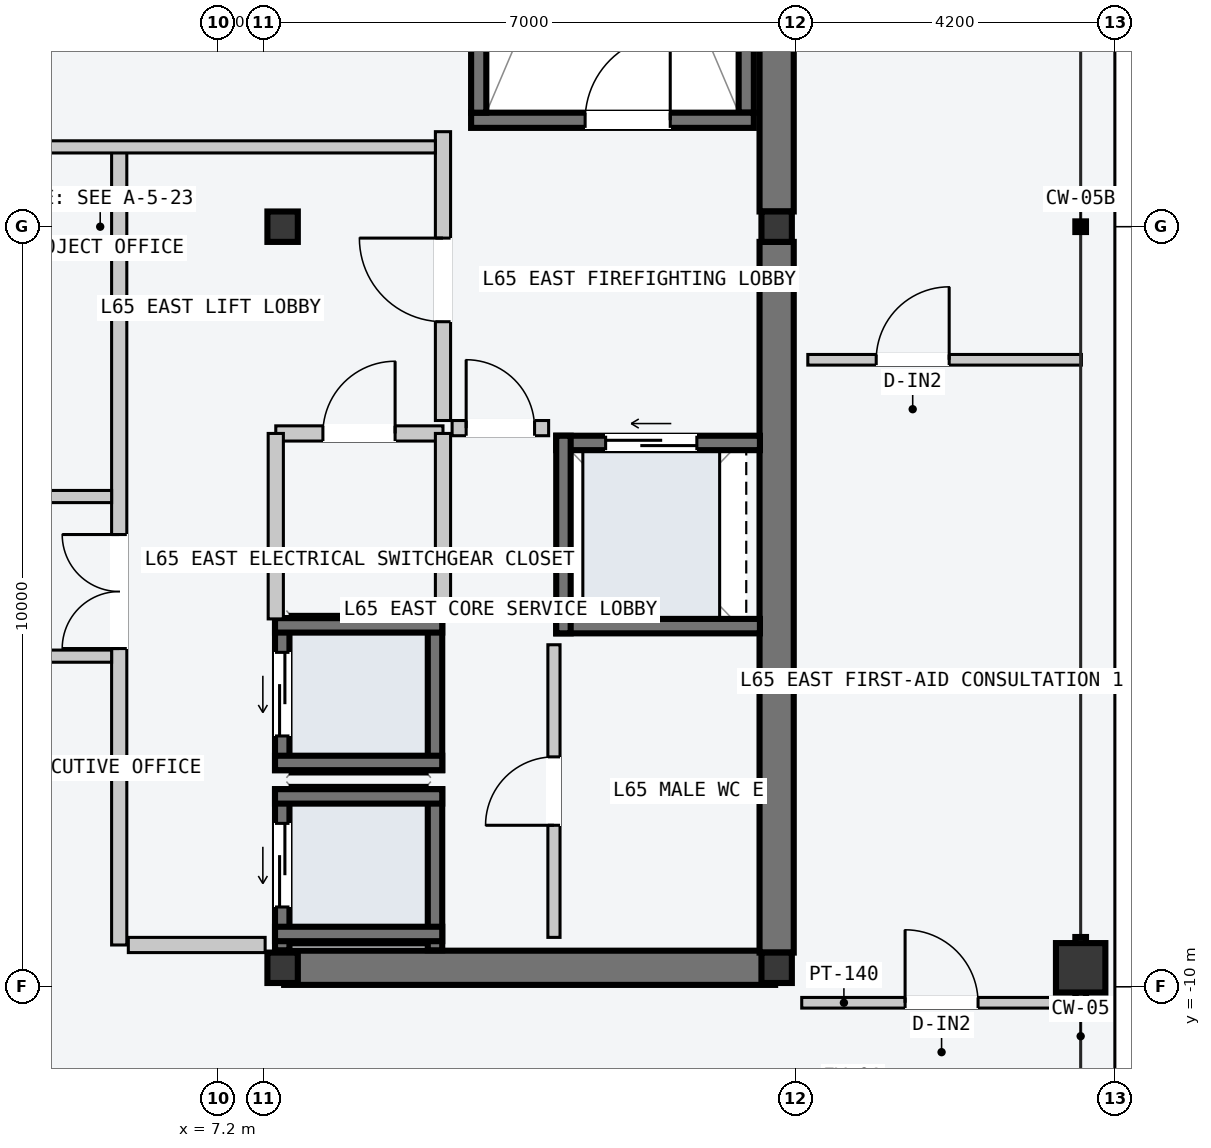
"""IFC4 building model, lengths in metres.
Left out: names, types, materials, properties, quantities, classifications, styles, units other than length and angle.
Written with IfcOpenShell. Run it as: python <this file> out.ifc"""

import sys

from ifc_helpers import new_model, si_unit, direction, frame, frame_2d, origin, origin_2d, place, context, subcontext, project, spatial, rectangle, hollow_rectangle, i_section, extrude, element, fill, save


model = new_model("IFC4")
c1 = context("Model", 3, precision=1e-05, world=origin(), true_north=direction((0.0, 1.0)))
c2 = subcontext(c1, "Body", "Model", "MODEL_VIEW")
j1 = project(units=[si_unit("LENGTHUNIT", "METRE"), si_unit("PLANEANGLEUNIT", "RADIAN")], contexts=[c1])
p1 = place(None, origin())
s1 = spatial("IfcSite", under=j1, at=p1, CompositionType="ELEMENT")
p2 = place(p1, origin())
s2 = spatial("IfcBuilding", under=s1, at=p2, CompositionType="ELEMENT")
p3 = place(p2, frame((0.0, 0.0, 247.2)))
s3 = spatial("IfcBuildingStorey", under=s2, at=p3, CompositionType="ELEMENT", Elevation=247.2)
p4 = place(p3, frame((8.07, -9.75, -0.2), z_axis=(0.0, 0.0, 1.0), x_axis=(1.0, 0.0, 0.0)))
e1 = element("IfcWall", 1, at=p4, inside=s3, PredefinedType="SHEAR", context=c2, shape_type="SweptSolid", body=[
    extrude(rectangle(XDim=6.46, YDim=0.45, at=frame_2d((3.23, 0.0))), origin(), (0.0, 0.0, 1.0), 3.6),
])
for number, where, z_axis, x_axis in (
    (2, (14.55, -9.55, -0.2), (0.0, 0.0, 1.0), (0.0, 1.0, 0.0)),
    (3, (14.55, 0.2, -0.2), (0.0, 0.0, 1.0), (0.0, 1.0, 0.0)),
):
    element("IfcWall", number, at=place(p3, frame(where, z_axis=z_axis, x_axis=x_axis)), inside=s3, PredefinedType="SHEAR", context=c2, shape_type="SweptSolid", body=[
        extrude(rectangle(XDim=9.35, YDim=0.45, at=frame_2d((4.675, 0.0))), origin(), (0.0, 0.0, 1.0), 3.6),
    ])
p5 = place(p3, frame((14.15, 1.5, -0.2), z_axis=(0.0, 0.0, 1.0), x_axis=(0.0, 1.0, 0.0)))
e4 = element("IfcWall", 4, at=p5, inside=s3, PredefinedType="SOLIDWALL", context=c2, shape_type="SweptSolid", body=[
    extrude(rectangle(XDim=7.8, YDim=0.2, at=frame_2d((3.9, 0.0))), origin(), (0.0, 0.0, 1.0), 3.6),
])
p6 = place(p3, frame((10.53, 1.4, -0.2), z_axis=(0.0, 0.0, 1.0), x_axis=(1.0, 0.0, 0.0)))
e5 = element("IfcWall", 5, at=p6, inside=s3, PredefinedType="SOLIDWALL", context=c2, shape_type="SweptSolid", body=[
    extrude(rectangle(XDim=3.72, YDim=0.2, at=frame_2d((1.86, 0.0))), origin(), (0.0, 0.0, 1.0), 3.6),
])
p7 = place(p6, frame((1.5, 0.0, 0.2)))
e6 = element("IfcOpeningElement", 6, at=p7, cuts=e5, PredefinedType="OPENING", context=c2, shape_type="SweptSolid", body=[
    extrude(rectangle(XDim=1.12, YDim=2.18, at=frame_2d((0.56, 1.09))), frame((0.0, 0.11, 0.0), z_axis=(0.0, -1.0, 0.0), x_axis=(1.0, 0.0, 0.0)), (0.0, 0.0, 1.0), 0.22),
])
p8 = place(p3, frame((10.63, 1.5, -0.2), z_axis=(0.0, 0.0, 1.0), x_axis=(0.0, 1.0, 0.0)))
e7 = element("IfcWall", 7, at=p8, inside=s3, PredefinedType="SOLIDWALL", context=c2, shape_type="SweptSolid", body=[
    extrude(rectangle(XDim=7.8, YDim=0.2, at=frame_2d((3.9, 0.0))), origin(), (0.0, 0.0, 1.0), 3.6),
])
for number, where, z_axis, x_axis in (
    (8, (8.05, -9.75, 0.0), (0.0, 0.0, 1.0), (1.0, 0.0, 0.0)),
    (9, (8.05, 0.0, 0.0), (0.0, 0.0, 1.0), (1.0, 0.0, 0.0)),
    (10, (14.55, -9.75, 0.0), (0.0, 0.0, 1.0), (1.0, 0.0, 0.0)),
    (11, (14.55, 0.0, 0.0), (0.0, 0.0, 1.0), (1.0, 0.0, 0.0)),
):
    element("IfcColumn", number, at=place(p3, frame(where, z_axis=z_axis, x_axis=x_axis)), inside=s3, PredefinedType="COLUMN", context=c2, shape_type="SweptSolid", body=[
        extrude(i_section(OverallWidth=0.4, OverallDepth=0.4, WebThickness=0.013, FlangeThickness=0.021, at=origin_2d()), origin(), (0.0, 0.0, 1.0), 3.6),
    ])
p9 = place(p3, frame((18.55, -9.75, 0.0), z_axis=(0.0, 0.0, 1.0), x_axis=(0.0, 1.0, 0.0)))
e12 = element("IfcColumn", 12, at=p9, inside=s3, PredefinedType="COLUMN", context=c2, shape_type="SweptSolid", body=[
    extrude(hollow_rectangle(XDim=0.65, YDim=0.65, WallThickness=0.028, at=origin_2d()), origin(), (0.0, 0.0, 1.0), 3.6),
])
p10 = place(p3, frame((8.045, -9.52, -0.2), z_axis=(0.0, 0.0, 1.0), x_axis=(0.0, 1.0, 0.0)))
e13 = element("IfcWall", 13, at=p10, inside=s3, PredefinedType="SOLIDWALL", context=c2, shape_type="SweptSolid", body=[
    extrude(rectangle(XDim=2.12, YDim=0.19, at=frame_2d((1.06, 0.0))), origin(), (0.0, 0.0, 1.0), 3.6),
])
p11 = place(p10, frame((0.57, 0.0, 0.2)))
e14 = element("IfcOpeningElement", 14, at=p11, cuts=e13, PredefinedType="OPENING", context=c2, shape_type="SweptSolid", body=[
    extrude(rectangle(XDim=1.1, YDim=2.2, at=frame_2d((0.55, 1.1))), frame((0.0, 0.105, 0.0), z_axis=(0.0, -1.0, 0.0), x_axis=(1.0, 0.0, 0.0)), (0.0, 0.0, 1.0), 0.21),
])
p12 = place(p3, frame((10.055, -9.52, -0.2), z_axis=(0.0, 0.0, 1.0), x_axis=(0.0, 1.0, 0.0)))
e15 = element("IfcWall", 15, at=p12, inside=s3, PredefinedType="SOLIDWALL", context=c2, shape_type="SweptSolid", body=[
    extrude(rectangle(XDim=2.12, YDim=0.19, at=frame_2d((1.06, 0.0))), origin(), (0.0, 0.0, 1.0), 3.6),
])
for number, where, z_axis, x_axis in (
    (16, (7.95, -7.495, -0.2), (0.0, 0.0, 1.0), (1.0, 0.0, 0.0)),
    (17, (7.95, -9.305, -0.2), (0.0, 0.0, 1.0), (1.0, 0.0, 0.0)),
):
    element("IfcWall", number, at=place(p3, frame(where, z_axis=z_axis, x_axis=x_axis)), inside=s3, PredefinedType="SOLIDWALL", context=c2, shape_type="SweptSolid", body=[
        extrude(rectangle(XDim=2.2, YDim=0.19, at=frame_2d((1.1, 0.0))), origin(), (0.0, 0.0, 1.0), 3.6),
    ])
p13 = place(p3, frame((8.045, -7.15, -0.2), z_axis=(0.0, 0.0, 1.0), x_axis=(0.0, 1.0, 0.0)))
e18 = element("IfcWall", 18, at=p13, inside=s3, PredefinedType="SOLIDWALL", context=c2, shape_type="SweptSolid", body=[
    extrude(rectangle(XDim=2.0, YDim=0.19, at=frame_2d((1.0, 0.0))), origin(), (0.0, 0.0, 1.0), 3.6),
])
p14 = place(p13, frame((0.45, 0.0, 0.2)))
e19 = element("IfcOpeningElement", 19, at=p14, cuts=e18, PredefinedType="OPENING", context=c2, shape_type="SweptSolid", body=[
    extrude(rectangle(XDim=1.1, YDim=2.2, at=frame_2d((0.55, 1.1))), frame((0.0, 0.105, 0.0), z_axis=(0.0, -1.0, 0.0), x_axis=(1.0, 0.0, 0.0)), (0.0, 0.0, 1.0), 0.21),
])
p15 = place(p3, frame((10.055, -7.15, -0.2), z_axis=(0.0, 0.0, 1.0), x_axis=(0.0, 1.0, 0.0)))
e20 = element("IfcWall", 20, at=p15, inside=s3, PredefinedType="SOLIDWALL", context=c2, shape_type="SweptSolid", body=[
    extrude(rectangle(XDim=2.0, YDim=0.19, at=frame_2d((1.0, 0.0))), origin(), (0.0, 0.0, 1.0), 3.6),
])
for number, where, z_axis, x_axis in (
    (21, (7.95, -5.245, -0.2), (0.0, 0.0, 1.0), (1.0, 0.0, 0.0)),
    (22, (7.95, -7.055, -0.2), (0.0, 0.0, 1.0), (1.0, 0.0, 0.0)),
):
    element("IfcWall", number, at=place(p3, frame(where, z_axis=z_axis, x_axis=x_axis)), inside=s3, PredefinedType="SOLIDWALL", context=c2, shape_type="SweptSolid", body=[
        extrude(rectangle(XDim=2.2, YDim=0.19, at=frame_2d((1.1, 0.0))), origin(), (0.0, 0.0, 1.0), 3.6),
    ])
p16 = place(p3, frame((11.65, -2.845, -0.2), z_axis=(0.0, 0.0, 1.0), x_axis=(1.0, 0.0, 0.0)))
e23 = element("IfcWall", 23, at=p16, inside=s3, PredefinedType="SOLIDWALL", context=c2, shape_type="SweptSolid", body=[
    extrude(rectangle(XDim=2.68, YDim=0.19, at=frame_2d((1.34, 0.0))), origin(), (0.0, 0.0, 1.0), 3.6),
])
p17 = place(p16, frame((0.65, 0.0, 0.2)))
e24 = element("IfcOpeningElement", 24, at=p17, cuts=e23, PredefinedType="OPENING", context=c2, shape_type="SweptSolid", body=[
    extrude(rectangle(XDim=1.2, YDim=2.2, at=frame_2d((0.6, 1.1))), frame((0.0, 0.105, 0.0), z_axis=(0.0, -1.0, 0.0), x_axis=(1.0, 0.0, 0.0)), (0.0, 0.0, 1.0), 0.21),
])
p18 = place(p3, frame((11.65, -5.255, -0.2), z_axis=(0.0, 0.0, 1.0), x_axis=(1.0, 0.0, 0.0)))
e25 = element("IfcWall", 25, at=p18, inside=s3, PredefinedType="SOLIDWALL", context=c2, shape_type="SweptSolid", body=[
    extrude(rectangle(XDim=2.68, YDim=0.19, at=frame_2d((1.34, 0.0))), origin(), (0.0, 0.0, 1.0), 3.6),
])
p19 = place(p3, frame((11.745, -5.35, -0.2), z_axis=(0.0, 0.0, 1.0), x_axis=(0.0, 1.0, 0.0)))
e26 = element("IfcWall", 26, at=p19, inside=s3, PredefinedType="SOLIDWALL", context=c2, shape_type="SweptSolid", body=[
    extrude(rectangle(XDim=2.6, YDim=0.19, at=frame_2d((1.3, 0.0))), origin(), (0.0, 0.0, 1.0), 3.6),
])
p20 = place(p3, frame((5.9, -9.45, 0.0), z_axis=(0.0, 0.0, 1.0), x_axis=(0.0, 1.0, 0.0)))
e27 = element("IfcWall", 27, at=p20, inside=s3, PredefinedType="PARTITIONING", context=c2, shape_type="SweptSolid", body=[
    extrude(rectangle(XDim=10.5, YDim=0.2, at=frame_2d((5.25, 0.0))), origin(), (0.0, 0.0, 1.0), 3.4),
])
p21 = place(p20, frame((3.9, 0.0, 0.0)))
e28 = element("IfcOpeningElement", 28, at=p21, cuts=e27, PredefinedType="OPENING", context=c2, shape_type="SweptSolid", body=[
    extrude(rectangle(XDim=1.5, YDim=2.2, at=frame_2d((0.75, 1.1))), frame((0.0, 0.11, 0.0), z_axis=(0.0, -1.0, 0.0), x_axis=(1.0, 0.0, 0.0)), (0.0, 0.0, 1.0), 0.22),
])
p22 = place(p3, frame((6.02, -9.45, 0.0), z_axis=(0.0, 0.0, 1.0), x_axis=(1.0, 0.0, 0.0)))
e29 = element("IfcWall", 29, at=p22, inside=s3, PredefinedType="PARTITIONING", context=c2, shape_type="SweptSolid", body=[
    extrude(rectangle(XDim=1.8, YDim=0.2, at=frame_2d((0.9, 0.0))), origin(), (0.0, 0.0, 1.0), 3.4),
])
p23 = place(p3, frame((10.16, -2.55, 0.0), z_axis=(0.0, 0.0, 1.0), x_axis=(0.0, 1.0, 0.0)))
e30 = element("IfcWall", 30, at=p23, inside=s3, PredefinedType="PARTITIONING", context=c2, shape_type="SweptSolid", body=[
    extrude(rectangle(XDim=3.8, YDim=0.2, at=frame_2d((1.9, 0.0))), origin(), (0.0, 0.0, 1.0), 3.4),
])
p24 = place(p23, frame((1.3, 0.0, 0.0)))
e31 = element("IfcOpeningElement", 31, at=p24, cuts=e30, PredefinedType="OPENING", context=c2, shape_type="SweptSolid", body=[
    extrude(rectangle(XDim=1.1, YDim=2.15, at=frame_2d((0.55, 1.075))), frame((0.0, 0.11, 0.0), z_axis=(0.0, -1.0, 0.0), x_axis=(1.0, 0.0, 0.0)), (0.0, 0.0, 1.0), 0.22),
])
p25 = place(p3, frame((10.28, -2.65, 0.0), z_axis=(0.0, 0.0, 1.0), x_axis=(1.0, 0.0, 0.0)))
e32 = element("IfcWall", 32, at=p25, inside=s3, PredefinedType="PARTITIONING", context=c2, shape_type="SweptSolid", body=[
    extrude(rectangle(XDim=1.27, YDim=0.2, at=frame_2d((0.635, 0.0))), origin(), (0.0, 0.0, 1.0), 3.4),
])
p26 = place(p25, frame((0.185, 0.0, 0.0)))
e33 = element("IfcOpeningElement", 33, at=p26, cuts=e32, PredefinedType="OPENING", context=c2, shape_type="SweptSolid", body=[
    extrude(rectangle(XDim=0.9, YDim=2.15, at=frame_2d((0.45, 1.075))), frame((0.0, 0.11, 0.0), z_axis=(0.0, -1.0, 0.0), x_axis=(1.0, 0.0, 0.0)), (0.0, 0.0, 1.0), 0.22),
])
p27 = place(p3, frame((7.96, -2.72, 0.0), z_axis=(0.0, 0.0, 1.0), x_axis=(1.0, 0.0, 0.0)))
e34 = element("IfcWall", 34, at=p27, inside=s3, PredefinedType="PARTITIONING", context=c2, shape_type="SweptSolid", body=[
    extrude(rectangle(XDim=2.2, YDim=0.2, at=frame_2d((1.1, 0.0))), origin(), (0.0, 0.0, 1.0), 3.4),
])
p28 = place(p27, frame((0.62, 0.0, 0.0)))
e35 = element("IfcOpeningElement", 35, at=p28, cuts=e34, PredefinedType="OPENING", context=c2, shape_type="SweptSolid", body=[
    extrude(rectangle(XDim=0.95, YDim=2.1, at=frame_2d((0.475, 1.05))), frame((0.0, 0.11, 0.0), z_axis=(0.0, -1.0, 0.0), x_axis=(1.0, 0.0, 0.0)), (0.0, 0.0, 1.0), 0.22),
])
for number, where, z_axis, x_axis in (
    (36, (7.96, -5.16, 0.0), (0.0, 0.0, 1.0), (0.0, 1.0, 0.0)),
    (37, (10.16, -5.16, 0.0), (0.0, 0.0, 1.0), (0.0, 1.0, 0.0)),
):
    element("IfcWall", number, at=place(p3, frame(where, z_axis=z_axis, x_axis=x_axis)), inside=s3, PredefinedType="PARTITIONING", context=c2, shape_type="SweptSolid", body=[
        extrude(rectangle(XDim=2.44, YDim=0.2, at=frame_2d((1.22, 0.0))), origin(), (0.0, 0.0, 1.0), 3.4),
    ])
p29 = place(p3, frame((11.62, -9.35, 0.0), z_axis=(0.0, 0.0, 1.0), x_axis=(0.0, 1.0, 0.0)))
e38 = element("IfcWall", 38, at=p29, inside=s3, PredefinedType="PARTITIONING", context=c2, shape_type="SweptSolid", body=[
    extrude(rectangle(XDim=3.85, YDim=0.16, at=frame_2d((1.925, 0.0))), origin(), (0.0, 0.0, 1.0), 3.4),
])
p30 = place(p29, frame((1.475, 0.0, 0.0)))
e39 = element("IfcOpeningElement", 39, at=p30, cuts=e38, PredefinedType="OPENING", context=c2, shape_type="SweptSolid", body=[
    extrude(rectangle(XDim=0.9, YDim=2.15, at=frame_2d((0.45, 1.075))), frame((0.0, 0.09, 0.0), z_axis=(0.0, -1.0, 0.0), x_axis=(1.0, 0.0, 0.0)), (0.0, 0.0, 1.0), 0.18),
])
p31 = place(p3, frame((3.01, 1.05, 0.0), z_axis=(0.0, 0.0, 1.0), x_axis=(1.0, 0.0, 0.0)))
e40 = element("IfcWall", 40, at=p31, inside=s3, PredefinedType="PARTITIONING", context=c2, shape_type="SweptSolid", body=[
    extrude(rectangle(XDim=7.05, YDim=0.16, at=frame_2d((3.525, 0.0))), origin(), (0.0, 0.0, 1.0), 3.4),
])
for number, where, z_axis, x_axis in (
    (41, (3.01, -3.55, 0.0), (0.0, 0.0, 1.0), (1.0, 0.0, 0.0)),
    (42, (3.01, -5.65, 0.0), (0.0, 0.0, 1.0), (1.0, 0.0, 0.0)),
):
    element("IfcWall", number, at=place(p3, frame(where, z_axis=z_axis, x_axis=x_axis)), inside=s3, PredefinedType="PARTITIONING", context=c2, shape_type="SweptSolid", body=[
        extrude(rectangle(XDim=2.79, YDim=0.16, at=frame_2d((1.395, 0.0))), origin(), (0.0, 0.0, 1.0), 3.4),
    ])
p32 = place(p3, frame((14.88, -10.21, 0.0), z_axis=(0.0, 0.0, 1.0), x_axis=(1.0, 0.0, 0.0)))
e43 = element("IfcWall", 43, at=p32, inside=s3, PredefinedType="PARTITIONING", context=c2, shape_type="SweptSolid", body=[
    extrude(rectangle(XDim=3.68, YDim=0.14, at=frame_2d((1.84, 0.0))), origin(), (0.0, 0.0, 1.0), 3.4),
])
p33 = place(p32, frame((1.36, 0.0, 0.0)))
e44 = element("IfcOpeningElement", 44, at=p33, cuts=e43, PredefinedType="OPENING", context=c2, shape_type="SweptSolid", body=[
    extrude(rectangle(XDim=0.96, YDim=2.18, at=frame_2d((0.48, 1.09))), frame((0.0, 0.08, 0.0), z_axis=(0.0, -1.0, 0.0), x_axis=(1.0, 0.0, 0.0)), (0.0, 0.0, 1.0), 0.16),
])
p34 = place(p3, frame((14.96, -1.751, 0.0), z_axis=(0.0, 0.0, 1.0), x_axis=(1.0, 0.0, 0.0)))
e45 = element("IfcWall", 45, at=p34, inside=s3, PredefinedType="PARTITIONING", context=c2, shape_type="SweptSolid", body=[
    extrude(rectangle(XDim=3.6, YDim=0.14, at=frame_2d((1.8, 0.0))), origin(), (0.0, 0.0, 1.0), 3.4),
])
p35 = place(p34, frame((0.9, 0.0, 0.0)))
e46 = element("IfcOpeningElement", 46, at=p35, cuts=e45, PredefinedType="OPENING", context=c2, shape_type="SweptSolid", body=[
    extrude(rectangle(XDim=0.96, YDim=2.18, at=frame_2d((0.48, 1.09))), frame((0.0, 0.08, 0.0), z_axis=(0.0, -1.0, 0.0), x_axis=(1.0, 0.0, 0.0)), (0.0, 0.0, 1.0), 0.16),
])
p36 = place(p7, origin())
e47 = element("IfcDoor", 47, at=p36, inside=s3, OperationType="SINGLE_SWING_RIGHT", PredefinedType="DOOR", context=c2, shape_type="SweptSolid", body=[
    extrude(rectangle(XDim=1.12, YDim=2.18, at=frame_2d((0.56, 1.09))), frame((0.0, 0.025, 0.0), z_axis=(0.0, -1.0, 0.0), x_axis=(1.0, 0.0, 0.0)), (0.0, 0.0, 1.0), 0.05),
])
fill(e6, e47)
p37 = place(p11, origin())
e48 = element("IfcDoor", 48, at=p37, inside=s3, OperationType="SLIDING_TO_LEFT", PredefinedType="DOOR", context=c2, shape_type="SweptSolid", body=[
    extrude(rectangle(XDim=1.1, YDim=2.2, at=frame_2d((0.55, 1.1))), frame((0.0, 0.025, 0.0), z_axis=(0.0, -1.0, 0.0), x_axis=(1.0, 0.0, 0.0)), (0.0, 0.0, 1.0), 0.05),
])
fill(e14, e48)
p38 = place(p14, origin())
e49 = element("IfcDoor", 49, at=p38, inside=s3, OperationType="SLIDING_TO_LEFT", PredefinedType="DOOR", context=c2, shape_type="SweptSolid", body=[
    extrude(rectangle(XDim=1.1, YDim=2.2, at=frame_2d((0.55, 1.1))), frame((0.0, 0.025, 0.0), z_axis=(0.0, -1.0, 0.0), x_axis=(1.0, 0.0, 0.0)), (0.0, 0.0, 1.0), 0.05),
])
fill(e19, e49)
p39 = place(p17, origin())
e50 = element("IfcDoor", 50, at=p39, inside=s3, OperationType="SLIDING_TO_LEFT", PredefinedType="DOOR", context=c2, shape_type="SweptSolid", body=[
    extrude(rectangle(XDim=1.2, YDim=2.2, at=frame_2d((0.6, 1.1))), frame((0.0, 0.025, 0.0), z_axis=(0.0, -1.0, 0.0), x_axis=(1.0, 0.0, 0.0)), (0.0, 0.0, 1.0), 0.05),
])
fill(e24, e50)
p40 = place(p21, origin())
e51 = element("IfcDoor", 51, at=p40, inside=s3, OperationType="DOUBLE_DOOR_SINGLE_SWING", PredefinedType="DOOR", context=c2, shape_type="SweptSolid", body=[
    extrude(rectangle(XDim=1.5, YDim=2.2, at=frame_2d((0.75, 1.1))), frame((0.0, 0.025, 0.0), z_axis=(0.0, -1.0, 0.0), x_axis=(1.0, 0.0, 0.0)), (0.0, 0.0, 1.0), 0.05),
])
fill(e28, e51)
p41 = place(p24, origin())
e52 = element("IfcDoor", 52, at=p41, inside=s3, OperationType="SINGLE_SWING_RIGHT", PredefinedType="DOOR", context=c2, shape_type="SweptSolid", body=[
    extrude(rectangle(XDim=1.1, YDim=2.15, at=frame_2d((0.55, 1.075))), frame((0.0, 0.025, 0.0), z_axis=(0.0, -1.0, 0.0), x_axis=(1.0, 0.0, 0.0)), (0.0, 0.0, 1.0), 0.05),
])
fill(e31, e52)
p42 = place(p26, origin())
e53 = element("IfcDoor", 53, at=p42, inside=s3, OperationType="SINGLE_SWING_LEFT", PredefinedType="DOOR", context=c2, shape_type="SweptSolid", body=[
    extrude(rectangle(XDim=0.9, YDim=2.15, at=frame_2d((0.45, 1.075))), frame((0.0, 0.025, 0.0), z_axis=(0.0, -1.0, 0.0), x_axis=(1.0, 0.0, 0.0)), (0.0, 0.0, 1.0), 0.05),
])
fill(e33, e53)
p43 = place(p28, origin())
e54 = element("IfcDoor", 54, at=p43, inside=s3, OperationType="SINGLE_SWING_RIGHT", PredefinedType="DOOR", context=c2, shape_type="SweptSolid", body=[
    extrude(rectangle(XDim=0.95, YDim=2.1, at=frame_2d((0.475, 1.05))), frame((0.0, 0.025, 0.0), z_axis=(0.0, -1.0, 0.0), x_axis=(1.0, 0.0, 0.0)), (0.0, 0.0, 1.0), 0.05),
])
fill(e35, e54)
p44 = place(p30, origin())
e55 = element("IfcDoor", 55, at=p44, inside=s3, OperationType="SINGLE_SWING_LEFT", PredefinedType="DOOR", context=c2, shape_type="SweptSolid", body=[
    extrude(rectangle(XDim=0.9, YDim=2.15, at=frame_2d((0.45, 1.075))), frame((0.0, 0.025, 0.0), z_axis=(0.0, -1.0, 0.0), x_axis=(1.0, 0.0, 0.0)), (0.0, 0.0, 1.0), 0.05),
])
fill(e39, e55)
p45 = place(p33, origin())
e56 = element("IfcDoor", 56, at=p45, inside=s3, OperationType="SINGLE_SWING_LEFT", PredefinedType="DOOR", context=c2, shape_type="SweptSolid", body=[
    extrude(rectangle(XDim=0.96, YDim=2.18, at=frame_2d((0.48, 1.09))), frame((0.0, 0.025, 0.0), z_axis=(0.0, -1.0, 0.0), x_axis=(1.0, 0.0, 0.0)), (0.0, 0.0, 1.0), 0.05),
])
fill(e44, e56)
p46 = place(p35, origin())
e57 = element("IfcDoor", 57, at=p46, inside=s3, OperationType="SINGLE_SWING_RIGHT", PredefinedType="DOOR", context=c2, shape_type="SweptSolid", body=[
    extrude(rectangle(XDim=0.96, YDim=2.18, at=frame_2d((0.48, 1.09))), frame((0.0, 0.025, 0.0), z_axis=(0.0, -1.0, 0.0), x_axis=(1.0, 0.0, 0.0)), (0.0, 0.0, 1.0), 0.05),
])
fill(e46, e57)
save(model, sys.argv[1])
